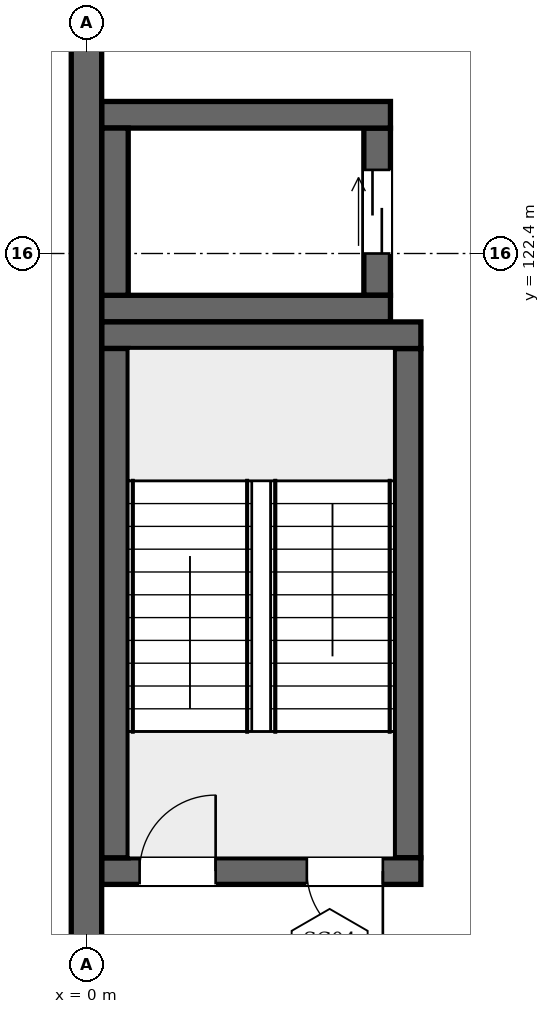
"""IFC4 building model, lengths in metres.
Left out: names, types, materials, properties, quantities, classifications, styles, units other than length and angle.
Written with IfcOpenShell. Run it as: python <this file> out.ifc"""

import sys

from ifc_helpers import new_model, si_unit, direction, frame, frame_2d, origin, place, context, subcontext, project, spatial, rectangle, extrude, element, fill, save


model = new_model("IFC4")
c1 = context("Model", 3, precision=1e-05, world=origin(), true_north=direction((0.0, 1.0)))
c2 = subcontext(c1, "Body", "Model", "MODEL_VIEW")
j1 = project(units=[si_unit("LENGTHUNIT", "METRE"), si_unit("PLANEANGLEUNIT", "RADIAN")], contexts=[c1])
p1 = place(None, origin())
s1 = spatial("IfcSite", under=j1, at=p1, CompositionType="ELEMENT")
p2 = place(p1, origin())
s2 = spatial("IfcBuilding", under=s1, at=p2, CompositionType="ELEMENT")
p3 = place(p2, frame((0.0, 0.0, 6.5)))
s3 = spatial("IfcBuildingStorey", under=s2, at=p3, CompositionType="ELEMENT", Elevation=6.5)
p4 = place(p3, frame((0.0, 94.12, 0.0), z_axis=(0.0, 0.0, 1.0), x_axis=(0.0, 1.0, 0.0)))
e1 = element("IfcWall", 1, at=p4, inside=s3, PredefinedType="SHEAR", context=c2, shape_type="SweptSolid", body=[
    extrude(rectangle(XDim=46.88, YDim=0.4, at=frame_2d((23.44, 0.0))), origin(), (0.0, 0.0, 1.0), 7.7),
])
p5 = place(p3, frame((0.2, 114.275, 0.0), z_axis=(0.0, 0.0, 1.0), x_axis=(1.0, 0.0, 0.0)))
e2 = element("IfcWall", 2, at=p5, inside=s3, PredefinedType="SHEAR", context=c2, shape_type="SweptSolid", body=[
    extrude(rectangle(XDim=4.2, YDim=0.35, at=frame_2d((2.1, 0.0))), origin(), (0.0, 0.0, 1.0), 7.7),
])
p6 = place(p5, frame((0.5, 0.0, 0.0)))
e3 = element("IfcOpeningElement", 3, at=p6, cuts=e2, PredefinedType="OPENING", context=c2, shape_type="SweptSolid", body=[
    extrude(rectangle(XDim=1.0, YDim=2.1, at=frame_2d((0.5, 1.05))), frame((0.0, 0.185, 0.0), z_axis=(0.0, -1.0, 0.0), x_axis=(1.0, 0.0, 0.0)), (0.0, 0.0, 1.0), 0.37),
])
p7 = place(p5, frame((2.7, 0.0, 0.0)))
e4 = element("IfcOpeningElement", 4, at=p7, cuts=e2, PredefinedType="OPENING", context=c2, shape_type="SweptSolid", body=[
    extrude(rectangle(XDim=1.0, YDim=2.1, at=frame_2d((0.5, 1.05))), frame((0.0, 0.185, 0.0), z_axis=(0.0, -1.0, 0.0), x_axis=(1.0, 0.0, 0.0)), (0.0, 0.0, 1.0), 0.37),
])
p8 = place(p3, frame((0.2, 121.325, 0.0), z_axis=(0.0, 0.0, 1.0), x_axis=(1.0, 0.0, 0.0)))
e5 = element("IfcWall", 5, at=p8, inside=s3, PredefinedType="SHEAR", context=c2, shape_type="SweptSolid", body=[
    extrude(rectangle(XDim=4.2, YDim=0.35, at=frame_2d((2.1, 0.0))), origin(), (0.0, 0.0, 1.0), 7.7),
])
for number, where, z_axis, x_axis in (
    (6, (0.375, 114.45, 0.0), (0.0, 0.0, 1.0), (0.0, 1.0, 0.0)),
    (7, (4.225, 114.45, 0.0), (0.0, 0.0, 1.0), (0.0, 1.0, 0.0)),
):
    element("IfcWall", number, at=place(p3, frame(where, z_axis=z_axis, x_axis=x_axis)), inside=s3, PredefinedType="SHEAR", context=c2, shape_type="SweptSolid", body=[
        extrude(rectangle(XDim=6.7, YDim=0.35, at=frame_2d((3.35, 0.0))), origin(), (0.0, 0.0, 1.0), 7.7),
    ])
for number, where, z_axis, x_axis in (
    (8, (0.2, 121.675, 0.0), (0.0, 0.0, 1.0), (1.0, 0.0, 0.0)),
    (9, (0.2, 124.225, 0.0), (0.0, 0.0, 1.0), (1.0, 0.0, 0.0)),
):
    element("IfcWall", number, at=place(p3, frame(where, z_axis=z_axis, x_axis=x_axis)), inside=s3, PredefinedType="SHEAR", context=c2, shape_type="SweptSolid", body=[
        extrude(rectangle(XDim=3.8, YDim=0.35, at=frame_2d((1.9, 0.0))), origin(), (0.0, 0.0, 1.0), 7.7),
    ])
p9 = place(p3, frame((0.375, 121.85, 0.0), z_axis=(0.0, 0.0, 1.0), x_axis=(0.0, 1.0, 0.0)))
e10 = element("IfcWall", 10, at=p9, inside=s3, PredefinedType="SHEAR", context=c2, shape_type="SweptSolid", body=[
    extrude(rectangle(XDim=2.2, YDim=0.35, at=frame_2d((1.1, 0.0))), origin(), (0.0, 0.0, 1.0), 7.7),
])
p10 = place(p3, frame((3.825, 121.85, 0.0), z_axis=(0.0, 0.0, 1.0), x_axis=(0.0, 1.0, 0.0)))
e11 = element("IfcWall", 11, at=p10, inside=s3, PredefinedType="SHEAR", context=c2, shape_type="SweptSolid", body=[
    extrude(rectangle(XDim=2.2, YDim=0.35, at=frame_2d((1.1, 0.0))), origin(), (0.0, 0.0, 1.0), 7.7),
])
p11 = place(p10, frame((0.55, 0.0, 0.0)))
e12 = element("IfcOpeningElement", 12, at=p11, cuts=e11, PredefinedType="OPENING", context=c2, shape_type="SweptSolid", body=[
    extrude(rectangle(XDim=1.1, YDim=2.1, at=frame_2d((0.55, 1.05))), frame((0.0, 0.185, 0.0), z_axis=(0.0, -1.0, 0.0), x_axis=(1.0, 0.0, 0.0)), (0.0, 0.0, 1.0), 0.37),
])
p12 = place(p6, origin())
e13 = element("IfcDoor", 13, at=p12, inside=s3, OperationType="SINGLE_SWING_RIGHT", PredefinedType="DOOR", context=c2, shape_type="SweptSolid", body=[
    extrude(rectangle(XDim=1.0, YDim=2.1, at=frame_2d((0.5, 1.05))), frame((0.0, 0.025, 0.0), z_axis=(0.0, -1.0, 0.0), x_axis=(1.0, 0.0, 0.0)), (0.0, 0.0, 1.0), 0.05),
])
fill(e3, e13)
p13 = place(p7, origin())
e14 = element("IfcDoor", 14, at=p13, inside=s3, OperationType="SINGLE_SWING_LEFT", PredefinedType="DOOR", context=c2, shape_type="SweptSolid", body=[
    extrude(rectangle(XDim=1.0, YDim=2.1, at=frame_2d((0.5, 1.05))), frame((0.0, 0.025, 0.0), z_axis=(0.0, -1.0, 0.0), x_axis=(1.0, 0.0, 0.0)), (0.0, 0.0, 1.0), 0.05),
])
fill(e4, e14)
p14 = place(p11, origin())
e15 = element("IfcDoor", 15, at=p14, inside=s3, OperationType="DOUBLE_DOOR_SLIDING", PredefinedType="DOOR", context=c2, shape_type="SweptSolid", body=[
    extrude(rectangle(XDim=1.1, YDim=2.1, at=frame_2d((0.55, 1.05))), frame((0.0, 0.025, 0.0), z_axis=(0.0, -1.0, 0.0), x_axis=(1.0, 0.0, 0.0)), (0.0, 0.0, 1.0), 0.05),
])
fill(e12, e15)
save(model, sys.argv[1])
